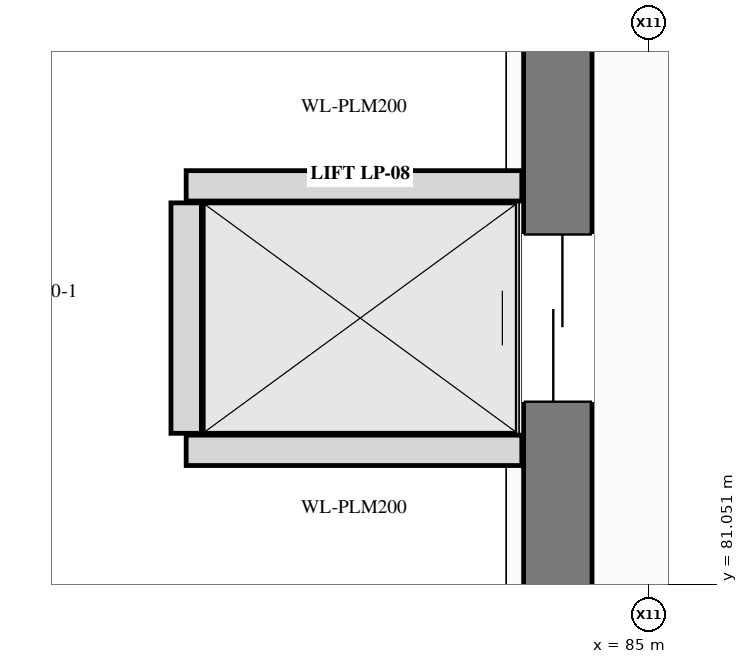
"""IFC4 building model, lengths in metres.
Left out: names, types, materials, properties, quantities, classifications, styles, units other than length and angle.
Written with IfcOpenShell. Run it as: python <this file> out.ifc"""

import sys

from ifc_helpers import new_model, si_unit, direction, frame, frame_2d, origin, place, context, subcontext, project, spatial, rectangle, extrude, element, fill, save


model = new_model("IFC4")
c1 = context("Model", 3, precision=1e-05, world=origin(), true_north=direction((0.0, 1.0)))
c2 = subcontext(c1, "Body", "Model", "MODEL_VIEW")
j1 = project(units=[si_unit("LENGTHUNIT", "METRE"), si_unit("PLANEANGLEUNIT", "RADIAN")], contexts=[c1])
p1 = place(None, origin())
s1 = spatial("IfcSite", under=j1, at=p1, CompositionType="ELEMENT")
p2 = place(p1, origin())
s2 = spatial("IfcBuilding", under=s1, at=p2, CompositionType="ELEMENT")
p3 = place(p2, origin())
s3 = spatial("IfcBuildingStorey", under=s2, at=p3, CompositionType="ELEMENT", Elevation=0.0)
p4 = place(p3, frame((84.4, 76.625, 0.0), z_axis=(0.0, 0.0, 1.0), x_axis=(0.0, 1.0, 0.0)))
e1 = element("IfcWall", 1, at=p4, inside=s3, PredefinedType="SHEAR", context=c2, shape_type="SweptSolid", body=[
    extrude(rectangle(XDim=9.35, YDim=0.45, at=frame_2d((4.675, 0.0))), origin(), (0.0, 0.0, 1.0), 5.4),
])
p5 = place(p4, frame((2.025, 0.0, 0.0)))
e2 = element("IfcOpeningElement", 2, at=p5, cuts=e1, PredefinedType="OPENING", context=c2, shape_type="SweptSolid", body=[
    extrude(rectangle(XDim=1.1, YDim=2.2, at=frame_2d((0.55, 1.1))), frame((0.0, 0.235, 0.0), z_axis=(0.0, -1.0, 0.0), x_axis=(1.0, 0.0, 0.0)), (0.0, 0.0, 1.0), 0.47),
])
p6 = place(p4, frame((5.625, 0.0, 0.0)))
e3 = element("IfcOpeningElement", 3, at=p6, cuts=e1, PredefinedType="OPENING", context=c2, shape_type="SweptSolid", body=[
    extrude(rectangle(XDim=1.1, YDim=2.2, at=frame_2d((0.55, 1.1))), frame((0.0, 0.235, 0.0), z_axis=(0.0, -1.0, 0.0), x_axis=(1.0, 0.0, 0.0)), (0.0, 0.0, 1.0), 0.47),
])
for number, where, z_axis, x_axis in (
    (4, (81.955, 81.93, 0.0), (0.0, 0.0, 1.0), (1.0, 0.0, 0.0)),
    (5, (81.955, 83.67, 0.0), (0.0, 0.0, 1.0), (1.0, 0.0, 0.0)),
):
    element("IfcWall", number, at=place(p3, frame(where, z_axis=z_axis, x_axis=x_axis)), inside=s3, PredefinedType="PLUMBINGWALL", context=c2, shape_type="SweptSolid", body=[
        extrude(rectangle(XDim=2.208, YDim=0.2, at=frame_2d((1.104, 0.0))), origin(), (0.0, 0.0, 1.0), 5.09),
    ])
p7 = place(p3, frame((81.955, 82.042, 0.0), z_axis=(0.0, 0.0, 1.0), x_axis=(0.0, 1.0, 0.0)))
e6 = element("IfcWall", 6, at=p7, inside=s3, PredefinedType="PLUMBINGWALL", context=c2, shape_type="SweptSolid", body=[
    extrude(rectangle(XDim=1.516, YDim=0.2, at=frame_2d((0.758, 0.0))), origin(), (0.0, 0.0, 1.0), 5.09),
])
p8 = place(p6, origin())
e7 = element("IfcDoor", 7, at=p8, inside=s3, OperationType="SLIDING_TO_RIGHT", PredefinedType="DOOR", context=c2, shape_type="SweptSolid", body=[
    extrude(rectangle(XDim=1.1, YDim=2.2, at=frame_2d((0.55, 1.1))), frame((0.0, 0.025, 0.0), z_axis=(0.0, -1.0, 0.0), x_axis=(1.0, 0.0, 0.0)), (0.0, 0.0, 1.0), 0.05),
])
fill(e3, e7)
save(model, sys.argv[1])
